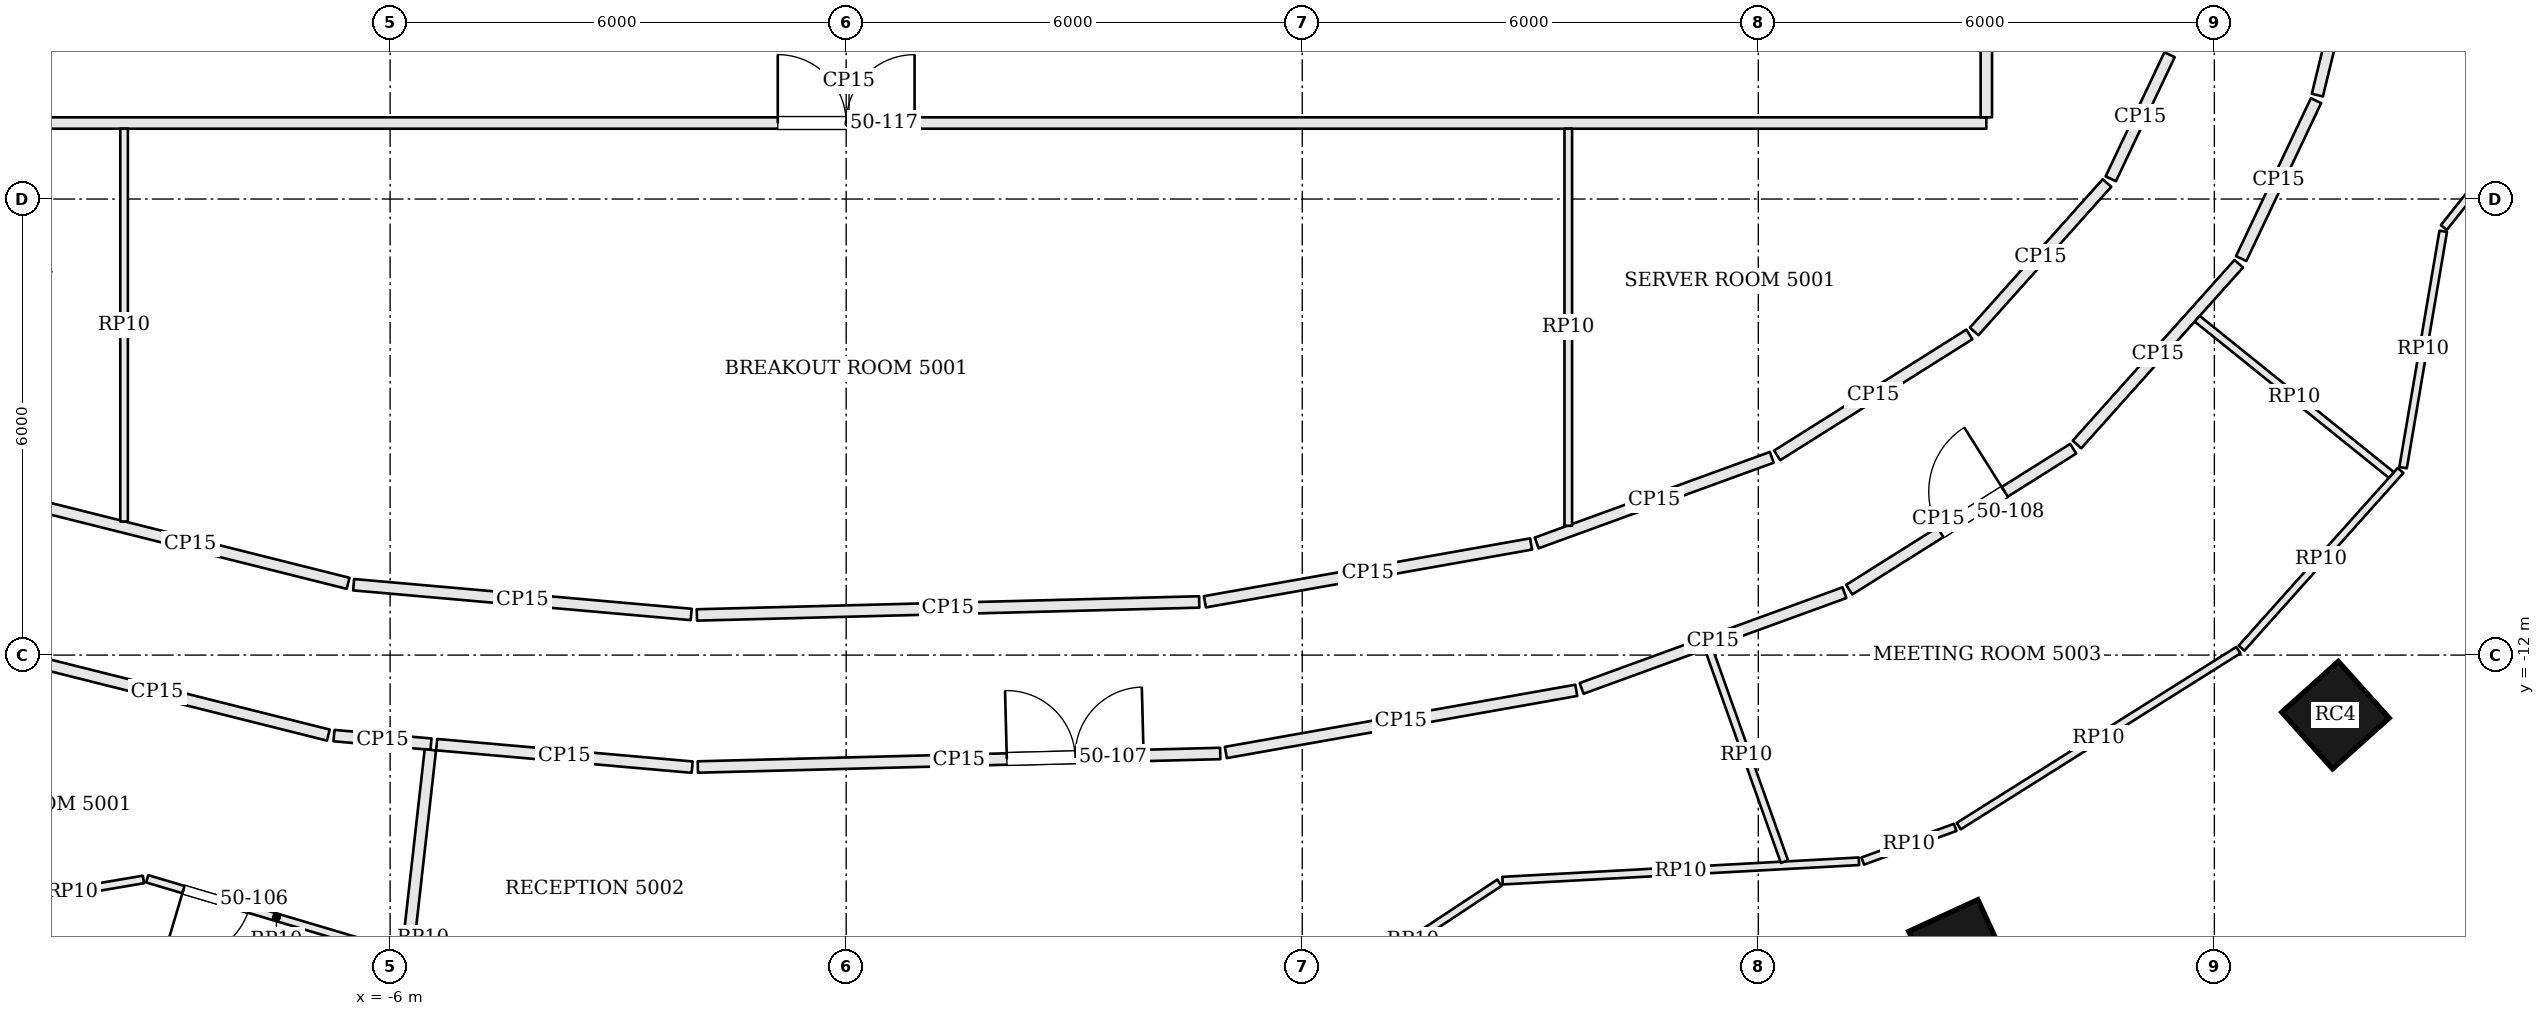
"""IFC4 building model, lengths in metres.
Left out: names, types, materials, properties, quantities, classifications, styles, units other than length and angle.
Written with IfcOpenShell. Run it as: python <this file> out.ifc"""

import sys

from ifc_helpers import new_model, si_unit, direction, frame, frame_2d, origin, origin_2d, place, context, subcontext, project, spatial, rectangle, extrude, element, fill, save


model = new_model("IFC4")
c1 = context("Model", 3, precision=1e-05, world=origin(), true_north=direction((0.0, 1.0)))
c2 = subcontext(c1, "Body", "Model", "MODEL_VIEW")
j1 = project(units=[si_unit("LENGTHUNIT", "METRE"), si_unit("PLANEANGLEUNIT", "RADIAN")], contexts=[c1])
p1 = place(None, origin())
s1 = spatial("IfcSite", under=j1, at=p1, CompositionType="ELEMENT")
p2 = place(p1, origin())
s2 = spatial("IfcBuilding", under=s1, at=p2, CompositionType="ELEMENT")
p3 = place(p2, frame((0.0, 0.0, 205.2)))
s3 = spatial("IfcBuildingStorey", under=s2, at=p3, CompositionType="ELEMENT", Elevation=205.2)
for number, where, z_axis, x_axis in (
    (1, (14.643, -15.881, 0.0), (0.0, 0.0, 1.0), (0.909, 0.417, 0.0)),
    (2, (19.593, -12.79, 0.0), (0.0, 0.0, 1.0), (0.744, 0.668, 0.0)),
):
    element("IfcColumn", number, at=place(p3, frame(where, z_axis=z_axis, x_axis=x_axis)), inside=s3, PredefinedType="COLUMN", context=c2, shape_type="SweptSolid", body=[
        extrude(rectangle(XDim=1.0, YDim=1.0, at=origin_2d()), origin(), (0.0, 0.0, 1.0), 3.9),
    ])
p4 = place(p3, frame((-11.319, -11.923, 0.0), z_axis=(0.0, 0.0, 1.0), x_axis=(0.969990815038, -0.243141561114, 0.0)))
e3 = element("IfcWall", 3, at=p4, inside=s3, PredefinedType="PARTITIONING", context=c2, shape_type="SweptSolid", body=[
    extrude(rectangle(XDim=4.645, YDim=0.15, at=frame_2d((2.323, 0.0))), origin(), (0.0, 0.0, 1.0), 3.084),
])
p5 = place(p3, frame((-6.738, -13.059, 0.0), z_axis=(0.0, 0.0, 1.0), x_axis=(0.996151409237, -0.087649129351, 0.0)))
e4 = element("IfcWall", 4, at=p5, inside=s3, PredefinedType="PARTITIONING", context=c2, shape_type="SweptSolid", body=[
    extrude(rectangle(XDim=1.281, YDim=0.15, at=frame_2d((0.641, 0.0))), origin(), (0.0, 0.0, 1.0), 3.084),
])
p6 = place(p3, frame((-6.161, -19.377, 0.0), z_axis=(0.0, 0.0, 1.0), x_axis=(0.111938367562, 0.993715151272, 0.0)))
e5 = element("IfcWall", 5, at=p6, inside=s3, PredefinedType="PARTITIONING", context=c2, shape_type="SweptSolid", body=[
    extrude(rectangle(XDim=6.17, YDim=0.15, at=frame_2d((3.085, 0.0))), origin(), (0.0, 0.0, 1.0), 3.184),
])
p7 = place(p3, frame((-5.387, -13.178, 0.0), z_axis=(0.0, 0.0, 1.0), x_axis=(0.996140835551, -0.087769218677, 0.0)))
e6 = element("IfcWall", 6, at=p7, inside=s3, PredefinedType="PARTITIONING", context=c2, shape_type="SweptSolid", body=[
    extrude(rectangle(XDim=3.374, YDim=0.15, at=frame_2d((1.687, 0.0))), origin(), (0.0, 0.0, 1.0), 3.084),
])
p8 = place(p3, frame((-1.951, -13.472, 0.0), z_axis=(0.0, 0.0, 1.0), x_axis=(0.999663898238, 0.025924709429, 0.0)))
e7 = element("IfcWall", 7, at=p8, inside=s3, PredefinedType="PARTITIONING", context=c2, shape_type="SweptSolid", body=[
    extrude(rectangle(XDim=6.875, YDim=0.15, at=frame_2d((3.437, 0.0))), origin(), (0.0, 0.0, 1.0), 3.084),
])
p9 = place(p8, frame((4.066, 0.0, 0.0)))
e8 = element("IfcOpeningElement", 8, at=p9, cuts=e7, PredefinedType="OPENING", context=c2, shape_type="SweptSolid", body=[
    extrude(rectangle(XDim=1.8, YDim=2.1, at=frame_2d((0.9, 1.05))), frame((0.0, 0.085, 0.0), z_axis=(0.0, -1.0, 0.0), x_axis=(1.0, 0.0, 0.0)), (0.0, 0.0, 1.0), 0.17),
])
p10 = place(p3, frame((4.995, -13.281, 0.0), z_axis=(0.0, 0.0, 1.0), x_axis=(0.98463411377, 0.174630071865, 0.0)))
e9 = element("IfcWall", 9, at=p10, inside=s3, PredefinedType="PARTITIONING", context=c2, shape_type="SweptSolid", body=[
    extrude(rectangle(XDim=4.682, YDim=0.15, at=frame_2d((2.341, 0.0))), origin(), (0.0, 0.0, 1.0), 3.084),
])
p11 = place(p3, frame((9.676, -12.438, 0.0), z_axis=(0.0, 0.0, 1.0), x_axis=(0.939640289748, 0.342163887461, 0.0)))
e10 = element("IfcWall", 10, at=p11, inside=s3, PredefinedType="PARTITIONING", context=c2, shape_type="SweptSolid", body=[
    extrude(rectangle(XDim=3.68, YDim=0.15, at=frame_2d((1.84, 0.0))), origin(), (0.0, 0.0, 1.0), 3.084),
])
p12 = place(p3, frame((13.197, -11.139, 0.0), z_axis=(0.0, 0.0, 1.0), x_axis=(0.846390903833, 0.532562144644, 0.0)))
e11 = element("IfcWall", 11, at=p12, inside=s3, PredefinedType="PARTITIONING", context=c2, shape_type="SweptSolid", body=[
    extrude(rectangle(XDim=3.481, YDim=0.15, at=frame_2d((1.741, 0.0))), origin(), (0.0, 0.0, 1.0), 3.084),
])
p13 = place(p12, frame((1.417, 0.0, 0.0)))
e12 = element("IfcOpeningElement", 12, at=p13, cuts=e11, PredefinedType="OPENING", context=c2, shape_type="SweptSolid", body=[
    extrude(rectangle(XDim=1.0, YDim=2.4, at=frame_2d((0.5, 1.2))), frame((0.0, 0.085, 0.0), z_axis=(0.0, -1.0, 0.0), x_axis=(1.0, 0.0, 0.0)), (0.0, 0.0, 1.0), 0.17),
])
p14 = place(p3, frame((16.193, -9.229, 0.0), z_axis=(0.0, 0.0, 1.0), x_axis=(0.666882089048, 0.745163256815, 0.0)))
e13 = element("IfcWall", 13, at=p14, inside=s3, PredefinedType="PARTITIONING", context=c2, shape_type="SweptSolid", body=[
    extrude(rectangle(XDim=3.19, YDim=0.15, at=frame_2d((1.595, 0.0))), origin(), (0.0, 0.0, 1.0), 3.084),
])
p15 = place(p3, frame((18.353, -6.784, 0.0), z_axis=(0.0, 0.0, 1.0), x_axis=(0.428086344739, 0.903737838894, 0.0)))
e14 = element("IfcWall", 14, at=p15, inside=s3, PredefinedType="PARTITIONING", context=c2, shape_type="SweptSolid", body=[
    extrude(rectangle(XDim=2.3, YDim=0.15, at=frame_2d((1.15, 0.0))), origin(), (0.0, 0.0, 1.0), 3.084),
])
p16 = place(p3, frame((19.355, -4.633, 0.0), z_axis=(0.0, 0.0, 1.0), x_axis=(0.236703930685, 0.971581828359, 0.0)))
e15 = element("IfcWall", 15, at=p16, inside=s3, PredefinedType="PARTITIONING", context=c2, shape_type="SweptSolid", body=[
    extrude(rectangle(XDim=1.626, YDim=0.15, at=frame_2d((0.813, 0.0))), origin(), (0.0, 0.0, 1.0), 3.084),
])
p17 = place(p3, frame((17.41, -4.102, 0.0), z_axis=(0.0, 0.0, 1.0), x_axis=(-0.428074720318, -0.903743345107, 0.0)))
e16 = element("IfcWall", 16, at=p17, inside=s3, PredefinedType="PARTITIONING", context=c2, shape_type="SweptSolid", body=[
    extrude(rectangle(XDim=1.806, YDim=0.15, at=frame_2d((0.903, 0.0))), origin(), (0.0, 0.0, 1.0), 3.084),
])
p18 = place(p3, frame((16.587, -5.789, 0.0), z_axis=(0.0, 0.0, 1.0), x_axis=(-0.666887460656, -0.745158449472, 0.0)))
e17 = element("IfcWall", 17, at=p18, inside=s3, PredefinedType="PARTITIONING", context=c2, shape_type="SweptSolid", body=[
    extrude(rectangle(XDim=2.62, YDim=0.15, at=frame_2d((1.31, 0.0))), origin(), (0.0, 0.0, 1.0), 3.084),
])
p19 = place(p3, frame((14.777, -7.781, 0.0), z_axis=(0.0, 0.0, 1.0), x_axis=(-0.846359741043, -0.532611667862, 0.0)))
e18 = element("IfcWall", 18, at=p19, inside=s3, PredefinedType="PARTITIONING", context=c2, shape_type="SweptSolid", body=[
    extrude(rectangle(XDim=2.987, YDim=0.15, at=frame_2d((1.494, 0.0))), origin(), (0.0, 0.0, 1.0), 3.084),
])
p20 = place(p3, frame((12.178, -9.398, 0.0), z_axis=(0.0, 0.0, 1.0), x_axis=(-0.939609240084, -0.342249143093, 0.0)))
e19 = element("IfcWall", 19, at=p20, inside=s3, PredefinedType="PARTITIONING", context=c2, shape_type="SweptSolid", body=[
    extrude(rectangle(XDim=3.292, YDim=0.15, at=frame_2d((1.646, 0.0))), origin(), (0.0, 0.0, 1.0), 3.084),
])
p21 = place(p3, frame((9.01, -10.538, 0.0), z_axis=(0.0, 0.0, 1.0), x_axis=(-0.984645638575, -0.174565077936, 0.0)))
e20 = element("IfcWall", 20, at=p21, inside=s3, PredefinedType="PARTITIONING", context=c2, shape_type="SweptSolid", body=[
    extrude(rectangle(XDim=4.358, YDim=0.15, at=frame_2d((2.179, 0.0))), origin(), (0.0, 0.0, 1.0), 3.084),
])
p22 = place(p3, frame((4.645, -11.301, 0.0), z_axis=(0.0, 0.0, 1.0), x_axis=(-0.9996648469, -0.02588810291, 0.0)))
e21 = element("IfcWall", 21, at=p22, inside=s3, PredefinedType="PARTITIONING", context=c2, shape_type="SweptSolid", body=[
    extrude(rectangle(XDim=6.611, YDim=0.15, at=frame_2d((3.305, 0.0))), origin(), (0.0, 0.0, 1.0), 3.084),
])
p23 = place(p3, frame((-2.039, -11.465, 0.0), z_axis=(0.0, 0.0, 1.0), x_axis=(-0.996139855484, 0.087780341286, 0.0)))
e22 = element("IfcWall", 22, at=p23, inside=s3, PredefinedType="PARTITIONING", context=c2, shape_type="SweptSolid", body=[
    extrude(rectangle(XDim=4.458, YDim=0.15, at=frame_2d((2.229, 0.0))), origin(), (0.0, 0.0, 1.0), 3.084),
])
p24 = place(p3, frame((-6.553, -11.056, 0.0), z_axis=(0.0, 0.0, 1.0), x_axis=(-0.970004917182, 0.243085294995, 0.0)))
e23 = element("IfcWall", 23, at=p24, inside=s3, PredefinedType="PARTITIONING", context=c2, shape_type="SweptSolid", body=[
    extrude(rectangle(XDim=4.284, YDim=0.15, at=frame_2d((2.142, 0.0))), origin(), (0.0, 0.0, 1.0), 3.084),
])
p25 = place(p3, frame((-14.925, -5.0, 0.0), z_axis=(0.0, 0.0, 1.0), x_axis=(1.0, 0.0, 0.0)))
e24 = element("IfcWall", 24, at=p25, inside=s3, PredefinedType="PARTITIONING", context=c2, shape_type="SweptSolid", body=[
    extrude(rectangle(XDim=29.925, YDim=0.15, at=frame_2d((14.962, 0.0))), origin(), (0.0, 0.0, 1.0), 3.084),
])
p26 = place(p25, frame((14.025, 0.0, 0.0)))
e25 = element("IfcOpeningElement", 25, at=p26, cuts=e24, PredefinedType="OPENING", context=c2, shape_type="SweptSolid", body=[
    extrude(rectangle(XDim=1.8, YDim=2.1, at=frame_2d((0.9, 1.05))), frame((0.0, 0.085, 0.0), z_axis=(0.0, -1.0, 0.0), x_axis=(1.0, 0.0, 0.0)), (0.0, 0.0, 1.0), 0.17),
])
p27 = place(p3, frame((15.0, -4.925, 0.0), z_axis=(0.0, 0.0, 1.0), x_axis=(0.0, 1.0, 0.0)))
e26 = element("IfcWall", 26, at=p27, inside=s3, PredefinedType="PARTITIONING", context=c2, shape_type="SweptSolid", body=[
    extrude(rectangle(XDim=12.583, YDim=0.15, at=frame_2d((6.292, 0.0))), origin(), (0.0, 0.0, 1.0), 3.084),
])
p28 = place(p27, frame((5.791, 0.0, 0.0)))
e27 = element("IfcOpeningElement", 27, at=p28, cuts=e26, PredefinedType="OPENING", context=c2, shape_type="SweptSolid", body=[
    extrude(rectangle(XDim=1.0, YDim=2.1, at=frame_2d((0.5, 1.05))), frame((0.0, 0.085, 0.0), z_axis=(0.0, -1.0, 0.0), x_axis=(1.0, 0.0, 0.0)), (0.0, 0.0, 1.0), 0.17),
])
p29 = place(p3, frame((-5.795, -15.954, 0.0), z_axis=(0.0, 0.0, 1.0), x_axis=(-0.95851298226, 0.285048877981, 0.0)))
e28 = element("IfcWall", 28, at=p29, inside=s3, PredefinedType="PARTITIONING", context=c2, shape_type="SweptSolid", body=[
    extrude(rectangle(XDim=3.548, YDim=0.1, at=frame_2d((1.774, 0.0))), origin(), (0.0, 0.0, 1.0), 3.084),
])
p30 = place(p29, frame((2.15, 0.0, 0.0)))
e29 = element("IfcOpeningElement", 29, at=p30, cuts=e28, PredefinedType="OPENING", context=c2, shape_type="SweptSolid", body=[
    extrude(rectangle(XDim=0.9, YDim=2.1, at=frame_2d((0.45, 1.05))), frame((0.0, 0.06, 0.0), z_axis=(0.0, -1.0, 0.0), x_axis=(1.0, 0.0, 0.0)), (0.0, 0.0, 1.0), 0.12),
])
p31 = place(p3, frame((-9.245, -14.952, 0.0), z_axis=(0.0, 0.0, 1.0), x_axis=(-0.985862618802, -0.167555652988, 0.0)))
e30 = element("IfcWall", 30, at=p31, inside=s3, PredefinedType="PARTITIONING", context=c2, shape_type="SweptSolid", body=[
    extrude(rectangle(XDim=1.906, YDim=0.1, at=frame_2d((0.953, 0.0))), origin(), (0.0, 0.0, 1.0), 3.084),
])
p32 = place(p3, frame((23.024, -3.85, 0.0), z_axis=(0.0, 0.0, 1.0), x_axis=(-0.621707275044, -0.783249681875, 0.0)))
e31 = element("IfcWall", 31, at=p32, inside=s3, PredefinedType="PARTITIONING", context=c2, shape_type="SweptSolid", body=[
    extrude(rectangle(XDim=3.224, YDim=0.1, at=frame_2d((1.612, 0.0))), origin(), (0.0, 0.0, 1.0), 3.084),
])
p33 = place(p32, frame((0.45, 0.0, 0.0)))
e32 = element("IfcOpeningElement", 32, at=p33, cuts=e31, PredefinedType="OPENING", context=c2, shape_type="SweptSolid", body=[
    extrude(rectangle(XDim=0.9, YDim=2.1, at=frame_2d((0.45, 1.05))), frame((0.0, 0.06, 0.0), z_axis=(0.0, -1.0, 0.0), x_axis=(1.0, 0.0, 0.0)), (0.0, 0.0, 1.0), 0.12),
])
p34 = place(p3, frame((21.011, -6.424, 0.0), z_axis=(0.0, 0.0, 1.0), x_axis=(-0.167360753367, -0.985895723813, 0.0)))
e33 = element("IfcWall", 33, at=p34, inside=s3, PredefinedType="PARTITIONING", context=c2, shape_type="SweptSolid", body=[
    extrude(rectangle(XDim=3.154, YDim=0.1, at=frame_2d((1.577, 0.0))), origin(), (0.0, 0.0, 1.0), 3.084),
])
p35 = place(p3, frame((20.45, -9.571, 0.0), z_axis=(0.0, 0.0, 1.0), x_axis=(-0.666910888996, -0.745137481368, 0.0)))
e34 = element("IfcWall", 34, at=p35, inside=s3, PredefinedType="PARTITIONING", context=c2, shape_type="SweptSolid", body=[
    extrude(rectangle(XDim=3.136, YDim=0.1, at=frame_2d((1.568, 0.0))), origin(), (0.0, 0.0, 1.0), 3.084),
])
p36 = place(p3, frame((18.316, -11.935, 0.0), z_axis=(0.0, 0.0, 1.0), x_axis=(-0.84637539713, -0.532586788358, 0.0)))
e35 = element("IfcWall", 35, at=p36, inside=s3, PredefinedType="PARTITIONING", context=c2, shape_type="SweptSolid", body=[
    extrude(rectangle(XDim=4.346, YDim=0.1, at=frame_2d((2.173, 0.0))), origin(), (0.0, 0.0, 1.0), 3.084),
])
p37 = place(p3, frame((14.59, -14.267, 0.0), z_axis=(0.0, 0.0, 1.0), x_axis=(-0.939589516809, -0.342303286433, 0.0)))
e36 = element("IfcWall", 36, at=p37, inside=s3, PredefinedType="PARTITIONING", context=c2, shape_type="SweptSolid", body=[
    extrude(rectangle(XDim=1.294, YDim=0.1, at=frame_2d((0.647, 0.0))), origin(), (0.0, 0.0, 1.0), 3.084),
])
p38 = place(p3, frame((13.324, -14.712, 0.0), z_axis=(0.0, 0.0, 1.0), x_axis=(-0.998525562832, -0.054283518413, 0.0)))
e37 = element("IfcWall", 37, at=p38, inside=s3, PredefinedType="PARTITIONING", context=c2, shape_type="SweptSolid", body=[
    extrude(rectangle(XDim=4.695, YDim=0.1, at=frame_2d((2.348, 0.0))), origin(), (0.0, 0.0, 1.0), 3.084),
])
p39 = place(p3, frame((8.594, -14.995, 0.0), z_axis=(0.0, 0.0, 1.0), x_axis=(-0.834069742789, -0.55165901077, 0.0)))
e38 = element("IfcWall", 38, at=p39, inside=s3, PredefinedType="PARTITIONING", context=c2, shape_type="SweptSolid", body=[
    extrude(rectangle(XDim=2.727, YDim=0.1, at=frame_2d((1.363, 0.0))), origin(), (0.0, 0.0, 1.0), 3.084),
])
p40 = place(p3, frame((11.344, -11.91, 0.0), z_axis=(0.0, 0.0, 1.0), x_axis=(0.335454055984, -0.942056567476, 0.0)))
e39 = element("IfcWall", 39, at=p40, inside=s3, PredefinedType="PARTITIONING", context=c2, shape_type="SweptSolid", body=[
    extrude(rectangle(XDim=2.98, YDim=0.1, at=frame_2d((1.49, 0.0))), origin(), (0.0, 0.0, 1.0), 3.084),
])
p41 = place(p3, frame((17.774, -7.575, 0.0), z_axis=(0.0, 0.0, 1.0), x_axis=(0.779013458918, -0.627007201573, 0.0)))
e40 = element("IfcWall", 40, at=p41, inside=s3, PredefinedType="PARTITIONING", context=c2, shape_type="SweptSolid", body=[
    extrude(rectangle(XDim=3.28, YDim=0.1, at=frame_2d((1.64, 0.0))), origin(), (0.0, 0.0, 1.0), 3.084),
])
p42 = place(p3, frame((-9.5, -10.242, 0.0), z_axis=(0.0, 0.0, 1.0), x_axis=(0.0, 1.0, 0.0)))
e41 = element("IfcWall", 41, at=p42, inside=s3, PredefinedType="PARTITIONING", context=c2, shape_type="SweptSolid", body=[
    extrude(rectangle(XDim=5.167, YDim=0.1, at=frame_2d((2.583, 0.0))), origin(), (0.0, 0.0, 1.0), 3.084),
])
p43 = place(p3, frame((9.5, -10.299, 0.0), z_axis=(0.0, 0.0, 1.0), x_axis=(0.0, 1.0, 0.0)))
e42 = element("IfcWall", 42, at=p43, inside=s3, PredefinedType="PARTITIONING", context=c2, shape_type="SweptSolid", body=[
    extrude(rectangle(XDim=5.224, YDim=0.1, at=frame_2d((2.612, 0.0))), origin(), (0.0, 0.0, 1.0), 3.084),
])
p44 = place(p30, origin())
e43 = element("IfcDoor", 43, at=p44, inside=s3, OperationType="SINGLE_SWING_RIGHT", PredefinedType="DOOR", context=c2, shape_type="SweptSolid", body=[
    extrude(rectangle(XDim=0.9, YDim=2.1, at=frame_2d((0.45, 1.05))), frame((0.0, 0.025, 0.0), z_axis=(0.0, -1.0, 0.0), x_axis=(1.0, 0.0, 0.0)), (0.0, 0.0, 1.0), 0.05),
])
fill(e29, e43)
p45 = place(p9, origin())
e44 = element("IfcDoor", 44, at=p45, inside=s3, OperationType="DOUBLE_DOOR_SINGLE_SWING", PredefinedType="DOOR", context=c2, shape_type="SweptSolid", body=[
    extrude(rectangle(XDim=1.8, YDim=2.1, at=frame_2d((0.9, 1.05))), frame((0.0, 0.025, 0.0), z_axis=(0.0, -1.0, 0.0), x_axis=(1.0, 0.0, 0.0)), (0.0, 0.0, 1.0), 0.05),
])
fill(e8, e44)
p46 = place(p13, origin())
e45 = element("IfcDoor", 45, at=p46, inside=s3, OperationType="SINGLE_SWING_RIGHT", PredefinedType="DOOR", context=c2, shape_type="SweptSolid", body=[
    extrude(rectangle(XDim=1.0, YDim=2.4, at=frame_2d((0.5, 1.2))), frame((0.0, 0.025, 0.0), z_axis=(0.0, -1.0, 0.0), x_axis=(1.0, 0.0, 0.0)), (0.0, 0.0, 1.0), 0.05),
])
fill(e12, e45)
p47 = place(p26, origin())
e46 = element("IfcDoor", 46, at=p47, inside=s3, OperationType="DOUBLE_DOOR_SINGLE_SWING", PredefinedType="DOOR", context=c2, shape_type="SweptSolid", body=[
    extrude(rectangle(XDim=1.8, YDim=2.1, at=frame_2d((0.9, 1.05))), frame((0.0, 0.025, 0.0), z_axis=(0.0, -1.0, 0.0), x_axis=(1.0, 0.0, 0.0)), (0.0, 0.0, 1.0), 0.05),
])
fill(e25, e46)
save(model, sys.argv[1])
